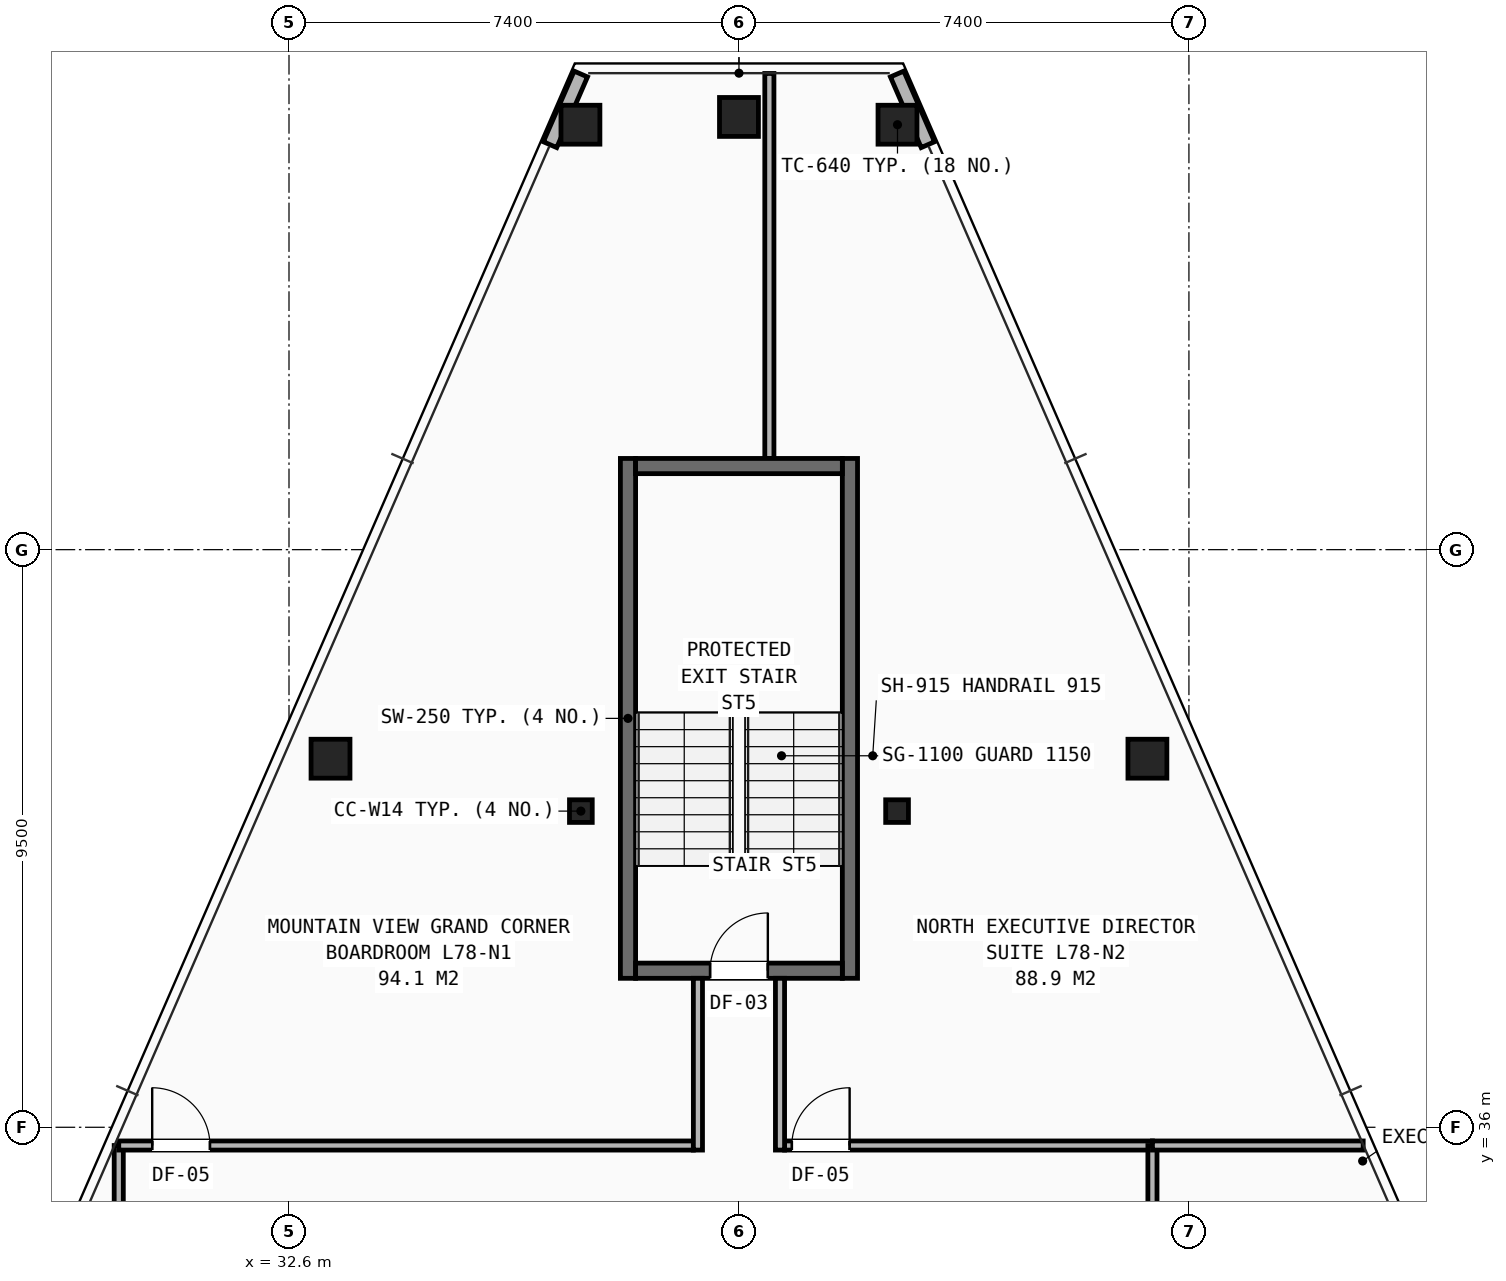
"""IFC4 building model, lengths in metres.
Left out: names, types, materials, properties, quantities, classifications, styles, units other than length and angle.
Written with IfcOpenShell. Run it as: python <this file> out.ifc"""

import sys

from ifc_helpers import new_model, si_unit, direction, frame, frame_2d, origin, origin_2d, place, context, subcontext, project, spatial, rectangle, hollow_rectangle, i_section, extrude, element, fill, save


model = new_model("IFC4")
c1 = context("Model", 3, precision=1e-05, world=origin(), true_north=direction((0.0, 1.0)))
c2 = subcontext(c1, "Body", "Model", "MODEL_VIEW")
j1 = project(units=[si_unit("LENGTHUNIT", "METRE"), si_unit("PLANEANGLEUNIT", "RADIAN")], contexts=[c1])
p1 = place(None, origin())
s1 = spatial("IfcSite", under=j1, at=p1, CompositionType="ELEMENT")
p2 = place(p1, origin())
s2 = spatial("IfcBuilding", under=s1, at=p2, CompositionType="ELEMENT")
p3 = place(p2, frame((0.0, 0.0, 276.0)))
s3 = spatial("IfcBuildingStorey", under=s2, at=p3, CompositionType="ELEMENT", Elevation=276.0)
for number, where, z_axis, x_axis in (
    (1, (37.4, 41.2, 0.0), (0.0, 0.0, 1.0), (1.0, 0.0, 0.0)),
    (2, (42.6, 41.2, 0.0), (0.0, 0.0, 1.0), (1.0, 0.0, 0.0)),
):
    element("IfcColumn", number, at=place(p3, frame(where, z_axis=z_axis, x_axis=x_axis)), inside=s3, PredefinedType="COLUMN", context=c2, shape_type="SweptSolid", body=[
        extrude(i_section(OverallWidth=0.374, OverallDepth=0.372, WebThickness=0.016, FlangeThickness=0.026, at=origin_2d()), origin(), (0.0, 0.0, 1.0), 3.5),
    ])
for number, where, z_axis, x_axis in (
    (3, (42.607, 52.489, 0.0), (0.0, 0.0, 1.0), (1.0, 0.0, 0.0)),
    (4, (40.0, 52.617, 0.0), (0.0, 0.0, 1.0), (1.0, 0.0, 0.0)),
    (5, (37.393, 52.489, 0.0), (0.0, 0.0, 1.0), (1.0, 0.0, 0.0)),
    (6, (33.283, 42.062, 0.0), (0.0, 0.0, 1.0), (1.0, 0.0, 0.0)),
    (7, (46.717, 42.062, 0.0), (0.0, 0.0, 1.0), (1.0, 0.0, 0.0)),
):
    element("IfcColumn", number, at=place(p3, frame(where, z_axis=z_axis, x_axis=x_axis)), inside=s3, PredefinedType="COLUMN", context=c2, shape_type="SweptSolid", body=[
        extrude(hollow_rectangle(XDim=0.64, YDim=0.64, WallThickness=0.045, at=origin_2d()), origin(), (0.0, 0.0, 1.0), 3.5),
    ])
for number, where, z_axis, x_axis in (
    (8, (37.399, 53.323, 0.0), (0.0, 0.0, 1.0), (-0.399, -0.917, 0.0)),
    (9, (43.107, 52.161, 0.0), (0.0, 0.0, 1.0), (-0.399, 0.917, 0.0)),
):
    element("IfcWall", number, at=place(p3, frame(where, z_axis=z_axis, x_axis=x_axis)), inside=s3, PredefinedType="SHEAR", context=c2, shape_type="SweptSolid", body=[
        extrude(rectangle(XDim=1.268, YDim=0.24, at=frame_2d((0.634, 0.0))), origin(), (0.0, 0.0, 1.0), 2.623),
    ])
p4 = place(p3, frame((29.8, 16.4, 0.0), z_axis=(0.0, 0.0, 1.0), x_axis=(0.0, 1.0, 0.0)))
e10 = element("IfcWall", 10, at=p4, inside=s3, PredefinedType="PARTITIONING", context=c2, shape_type="SweptSolid", body=[
    extrude(rectangle(XDim=19.3, YDim=0.15, at=frame_2d((9.65, 0.0))), origin(), (0.0, 0.0, 1.0), 2.292),
])
p5 = place(p4, frame((0.35, 0.0, 0.0)))
e11 = element("IfcOpeningElement", 11, at=p5, cuts=e10, PredefinedType="OPENING", context=c2, shape_type="SweptSolid", body=[
    extrude(rectangle(XDim=0.95, YDim=2.1, at=frame_2d((0.475, 1.05))), frame((0.0, 0.085, 0.0), z_axis=(0.0, -1.0, 0.0), x_axis=(1.0, 0.0, 0.0)), (0.0, 0.0, 1.0), 0.17),
])
p6 = place(p4, frame((4.15, 0.0, 0.0)))
e12 = element("IfcOpeningElement", 12, at=p6, cuts=e10, PredefinedType="OPENING", context=c2, shape_type="SweptSolid", body=[
    extrude(rectangle(XDim=0.95, YDim=2.1, at=frame_2d((0.475, 1.05))), frame((0.0, 0.085, 0.0), z_axis=(0.0, -1.0, 0.0), x_axis=(1.0, 0.0, 0.0)), (0.0, 0.0, 1.0), 0.17),
])
p7 = place(p4, frame((9.45, 0.0, 0.0)))
e13 = element("IfcOpeningElement", 13, at=p7, cuts=e10, PredefinedType="OPENING", context=c2, shape_type="SweptSolid", body=[
    extrude(rectangle(XDim=0.95, YDim=2.1, at=frame_2d((0.475, 1.05))), frame((0.0, 0.085, 0.0), z_axis=(0.0, -1.0, 0.0), x_axis=(1.0, 0.0, 0.0)), (0.0, 0.0, 1.0), 0.17),
])
p8 = place(p3, frame((29.8, 35.7, 0.0), z_axis=(0.0, 0.0, 1.0), x_axis=(1.0, 0.0, 0.0)))
e14 = element("IfcWall", 14, at=p8, inside=s3, PredefinedType="PARTITIONING", context=c2, shape_type="SweptSolid", body=[
    extrude(rectangle(XDim=9.45, YDim=0.15, at=frame_2d((4.725, 0.0))), origin(), (0.0, 0.0, 1.0), 2.628),
])
p9 = place(p8, frame((0.55, 0.0, 0.0)))
e15 = element("IfcOpeningElement", 15, at=p9, cuts=e14, PredefinedType="OPENING", context=c2, shape_type="SweptSolid", body=[
    extrude(rectangle(XDim=0.95, YDim=2.1, at=frame_2d((0.475, 1.05))), frame((0.0, 0.085, 0.0), z_axis=(0.0, -1.0, 0.0), x_axis=(1.0, 0.0, 0.0)), (0.0, 0.0, 1.0), 0.17),
])
p10 = place(p3, frame((40.75, 35.7, 0.0), z_axis=(0.0, 0.0, 1.0), x_axis=(1.0, 0.0, 0.0)))
e16 = element("IfcWall", 16, at=p10, inside=s3, PredefinedType="PARTITIONING", context=c2, shape_type="SweptSolid", body=[
    extrude(rectangle(XDim=6.05, YDim=0.15, at=frame_2d((3.025, 0.0))), origin(), (0.0, 0.0, 1.0), 3.25),
])
p11 = place(p10, frame((0.12, 0.0, 0.0)))
e17 = element("IfcOpeningElement", 17, at=p11, cuts=e16, PredefinedType="OPENING", context=c2, shape_type="SweptSolid", body=[
    extrude(rectangle(XDim=0.95, YDim=2.1, at=frame_2d((0.475, 1.05))), frame((0.0, 0.085, 0.0), z_axis=(0.0, -1.0, 0.0), x_axis=(1.0, 0.0, 0.0)), (0.0, 0.0, 1.0), 0.17),
])
p12 = place(p3, frame((46.8, 31.2, 0.0), z_axis=(0.0, 0.0, 1.0), x_axis=(0.0, 1.0, 0.0)))
e18 = element("IfcWall", 18, at=p12, inside=s3, PredefinedType="PARTITIONING", context=c2, shape_type="SweptSolid", body=[
    extrude(rectangle(XDim=4.5, YDim=0.15, at=frame_2d((2.25, 0.0))), origin(), (0.0, 0.0, 1.0), 2.705),
])
p13 = place(p3, frame((46.8, 35.7, 0.0), z_axis=(0.0, 0.0, 1.0), x_axis=(1.0, 0.0, 0.0)))
e19 = element("IfcWall", 19, at=p13, inside=s3, PredefinedType="PARTITIONING", context=c2, shape_type="SweptSolid", body=[
    extrude(rectangle(XDim=3.466, YDim=0.15, at=frame_2d((1.733, 0.0))), origin(), (0.0, 0.0, 1.0), 2.628),
])
p14 = place(p3, frame((40.5, 47.0, 0.0), z_axis=(0.0, 0.0, 1.0), x_axis=(0.0, 1.0, 0.0)))
e20 = element("IfcWall", 20, at=p14, inside=s3, PredefinedType="PARTITIONING", context=c2, shape_type="SweptSolid", body=[
    extrude(rectangle(XDim=6.332, YDim=0.15, at=frame_2d((3.166, 0.0))), origin(), (0.0, 0.0, 1.0), 2.628),
])
for number, where, z_axis, x_axis in (
    (21, (38.175, 38.45, 0.0), (0.0, 0.0, 1.0), (0.0, 1.0, 0.0)),
    (22, (41.825, 38.45, 0.0), (0.0, 0.0, 1.0), (0.0, 1.0, 0.0)),
):
    element("IfcWall", number, at=place(p3, frame(where, z_axis=z_axis, x_axis=x_axis)), inside=s3, PredefinedType="SHEAR", context=c2, shape_type="SweptSolid", body=[
        extrude(rectangle(XDim=8.55, YDim=0.25, at=frame_2d((4.275, 0.0))), origin(), (0.0, 0.0, 1.0), 3.25),
    ])
p15 = place(p3, frame((38.3, 38.575, 0.0), z_axis=(0.0, 0.0, 1.0), x_axis=(1.0, 0.0, 0.0)))
e23 = element("IfcWall", 23, at=p15, inside=s3, PredefinedType="SHEAR", context=c2, shape_type="SweptSolid", body=[
    extrude(rectangle(XDim=3.4, YDim=0.25, at=frame_2d((1.7, 0.0))), origin(), (0.0, 0.0, 1.0), 3.25),
])
p16 = place(p15, frame((1.225, 0.0, 0.0)))
e24 = element("IfcOpeningElement", 24, at=p16, cuts=e23, PredefinedType="OPENING", context=c2, shape_type="SweptSolid", body=[
    extrude(rectangle(XDim=0.95, YDim=2.1, at=frame_2d((0.475, 1.05))), frame((0.0, 0.135, 0.0), z_axis=(0.0, -1.0, 0.0), x_axis=(1.0, 0.0, 0.0)), (0.0, 0.0, 1.0), 0.27),
])
p17 = place(p3, frame((38.3, 46.875, 0.0), z_axis=(0.0, 0.0, 1.0), x_axis=(1.0, 0.0, 0.0)))
e25 = element("IfcWall", 25, at=p17, inside=s3, PredefinedType="SHEAR", context=c2, shape_type="SweptSolid", body=[
    extrude(rectangle(XDim=3.4, YDim=0.25, at=frame_2d((1.7, 0.0))), origin(), (0.0, 0.0, 1.0), 3.25),
])
for number, where, z_axis, x_axis in (
    (26, (39.325, 35.625, 0.0), (0.0, 0.0, 1.0), (0.0, 1.0, 0.0)),
    (27, (40.675, 35.625, 0.0), (0.0, 0.0, 1.0), (0.0, 1.0, 0.0)),
):
    element("IfcWall", number, at=place(p3, frame(where, z_axis=z_axis, x_axis=x_axis)), inside=s3, PredefinedType="PARTITIONING", context=c2, shape_type="SweptSolid", body=[
        extrude(rectangle(XDim=2.825, YDim=0.15, at=frame_2d((1.413, 0.0))), origin(), (0.0, 0.0, 1.0), 3.25),
    ])
p18 = place(p9, origin())
e28 = element("IfcDoor", 28, at=p18, inside=s3, OperationType="SINGLE_SWING_LEFT", PredefinedType="DOOR", context=c2, shape_type="SweptSolid", body=[
    extrude(rectangle(XDim=0.95, YDim=2.1, at=frame_2d((0.475, 1.05))), frame((0.0, 0.025, 0.0), z_axis=(0.0, -1.0, 0.0), x_axis=(1.0, 0.0, 0.0)), (0.0, 0.0, 1.0), 0.05),
])
fill(e15, e28)
p19 = place(p11, origin())
e29 = element("IfcDoor", 29, at=p19, inside=s3, OperationType="SINGLE_SWING_RIGHT", PredefinedType="DOOR", context=c2, shape_type="SweptSolid", body=[
    extrude(rectangle(XDim=0.95, YDim=2.1, at=frame_2d((0.475, 1.05))), frame((0.0, 0.025, 0.0), z_axis=(0.0, -1.0, 0.0), x_axis=(1.0, 0.0, 0.0)), (0.0, 0.0, 1.0), 0.05),
])
fill(e17, e29)
p20 = place(p16, origin())
e30 = element("IfcDoor", 30, at=p20, inside=s3, OperationType="SINGLE_SWING_RIGHT", PredefinedType="DOOR", context=c2, shape_type="SweptSolid", body=[
    extrude(rectangle(XDim=0.95, YDim=2.1, at=frame_2d((0.475, 1.05))), frame((0.0, 0.025, 0.0), z_axis=(0.0, -1.0, 0.0), x_axis=(1.0, 0.0, 0.0)), (0.0, 0.0, 1.0), 0.05),
])
fill(e24, e30)
save(model, sys.argv[1])
